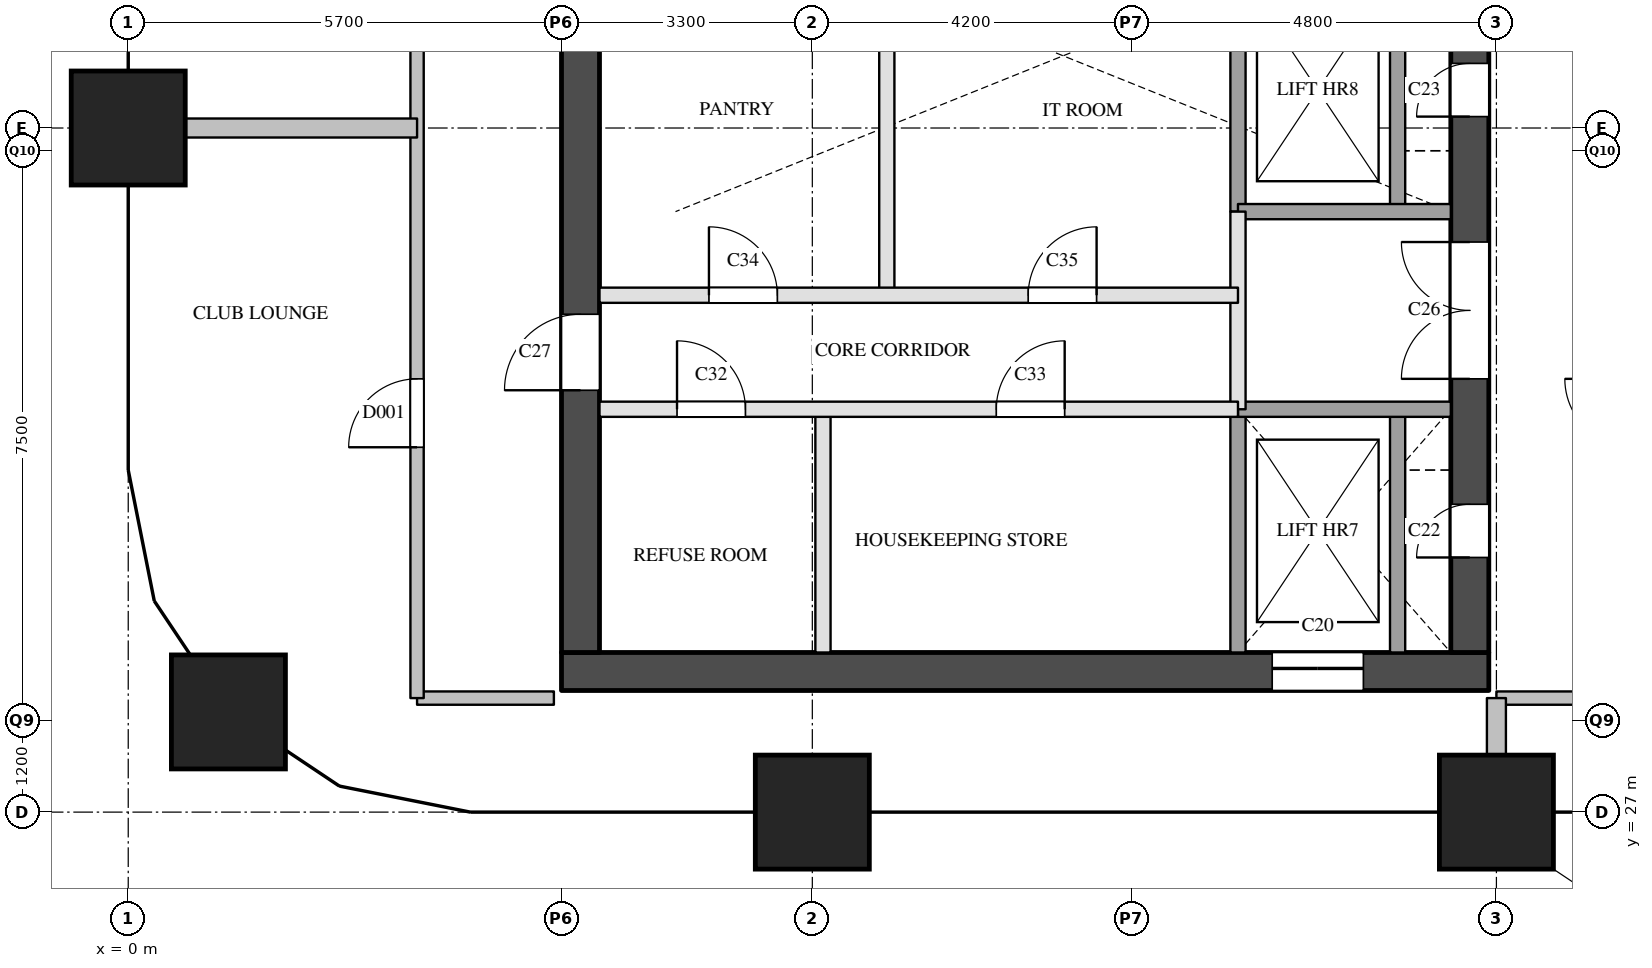
"""IFC4 building model, lengths in metres.
Left out: names, types, materials, properties, quantities, classifications, styles, units other than length and angle.
Written with IfcOpenShell. Run it as: python <this file> out.ifc"""

import sys

from ifc_helpers import new_model, si_unit, direction, frame, frame_2d, origin, origin_2d, place, context, subcontext, project, spatial, rectangle, extrude, element, fill, save


model = new_model("IFC4")
c1 = context("Model", 3, precision=1e-05, world=origin(), true_north=direction((0.0, 1.0)))
c2 = subcontext(c1, "Body", "Model", "MODEL_VIEW")
j1 = project(units=[si_unit("LENGTHUNIT", "METRE"), si_unit("PLANEANGLEUNIT", "RADIAN")], contexts=[c1])
p1 = place(None, origin())
s1 = spatial("IfcSite", under=j1, at=p1, CompositionType="ELEMENT")
p2 = place(p1, origin())
s2 = spatial("IfcBuilding", under=s1, at=p2, CompositionType="ELEMENT")
p3 = place(p2, frame((0.0, 0.0, 185.6)))
s3 = spatial("IfcBuildingStorey", under=s2, at=p3, CompositionType="ELEMENT", Elevation=185.6)
for number, where, z_axis, x_axis in (
    (1, (1.318, 28.318, 0.0), (0.0, 0.0, 1.0), (1.0, 0.0, 0.0)),
    (2, (0.0, 36.0, 0.0), (0.0, 0.0, 1.0), (1.0, 0.0, 0.0)),
    (3, (9.0, 27.0, 0.0), (0.0, 0.0, 1.0), (1.0, 0.0, 0.0)),
    (4, (18.0, 27.0, 0.0), (0.0, 0.0, 1.0), (1.0, 0.0, 0.0)),
):
    element("IfcColumn", number, at=place(p3, frame(where, z_axis=z_axis, x_axis=x_axis)), inside=s3, PredefinedType="COLUMN", context=c2, shape_type="SweptSolid", body=[
        extrude(rectangle(XDim=1.5, YDim=1.5, at=origin_2d()), origin(), (0.0, 0.0, 1.0), 3.9),
    ])
p4 = place(p3, frame((5.7, 28.85, 0.0), z_axis=(0.0, 0.0, 1.0), x_axis=(1.0, 0.0, 0.0)))
e5 = element("IfcWall", 5, at=p4, inside=s3, PredefinedType="SHEAR", context=c2, shape_type="SweptSolid", body=[
    extrude(rectangle(XDim=12.2, YDim=0.5, at=frame_2d((6.1, 0.0))), origin(), (0.0, 0.0, 1.0), 3.6),
])
p5 = place(p4, frame((9.35, 0.0, 0.0)))
e6 = element("IfcOpeningElement", 6, at=p5, cuts=e5, PredefinedType="OPENING", context=c2, shape_type="SweptSolid", body=[
    extrude(rectangle(XDim=1.2, YDim=2.1, at=frame_2d((0.6, 1.05))), frame((0.0, 0.26, 0.0), z_axis=(0.0, -1.0, 0.0), x_axis=(1.0, 0.0, 0.0)), (0.0, 0.0, 1.0), 0.52),
])
p6 = place(p3, frame((5.95, 29.1, 0.0), z_axis=(0.0, 0.0, 1.0), x_axis=(0.0, 1.0, 0.0)))
e7 = element("IfcWall", 7, at=p6, inside=s3, PredefinedType="SHEAR", context=c2, shape_type="SweptSolid", body=[
    extrude(rectangle(XDim=20.3, YDim=0.5, at=frame_2d((10.15, 0.0))), origin(), (0.0, 0.0, 1.0), 3.6),
])
p7 = place(p6, frame((3.45, 0.0, 0.0)))
e8 = element("IfcOpeningElement", 8, at=p7, cuts=e7, PredefinedType="OPENING", context=c2, shape_type="SweptSolid", body=[
    extrude(rectangle(XDim=1.0, YDim=2.1, at=frame_2d((0.5, 1.05))), frame((0.0, 0.26, 0.0), z_axis=(0.0, -1.0, 0.0), x_axis=(1.0, 0.0, 0.0)), (0.0, 0.0, 1.0), 0.52),
])
p8 = place(p6, frame((16.4, 0.0, 0.0)))
e9 = element("IfcOpeningElement", 9, at=p8, cuts=e7, PredefinedType="OPENING", context=c2, shape_type="SweptSolid", body=[
    extrude(rectangle(XDim=1.0, YDim=2.1, at=frame_2d((0.5, 1.05))), frame((0.0, 0.26, 0.0), z_axis=(0.0, -1.0, 0.0), x_axis=(1.0, 0.0, 0.0)), (0.0, 0.0, 1.0), 0.52),
])
p9 = place(p3, frame((17.65, 29.1, 0.0), z_axis=(0.0, 0.0, 1.0), x_axis=(0.0, 1.0, 0.0)))
e10 = element("IfcWall", 10, at=p9, inside=s3, PredefinedType="SHEAR", context=c2, shape_type="SweptSolid", body=[
    extrude(rectangle(XDim=20.3, YDim=0.5, at=frame_2d((10.15, 0.0))), origin(), (0.0, 0.0, 1.0), 3.6),
])
p10 = place(p9, frame((1.25, 0.0, 0.0)))
e11 = element("IfcOpeningElement", 11, at=p10, cuts=e10, PredefinedType="OPENING", context=c2, shape_type="SweptSolid", body=[
    extrude(rectangle(XDim=0.7, YDim=2.1, at=frame_2d((0.35, 1.05))), frame((0.0, 0.26, 0.0), z_axis=(0.0, -1.0, 0.0), x_axis=(1.0, 0.0, 0.0)), (0.0, 0.0, 1.0), 0.52),
])
p11 = place(p9, frame((7.05, 0.0, 0.0)))
e12 = element("IfcOpeningElement", 12, at=p11, cuts=e10, PredefinedType="OPENING", context=c2, shape_type="SweptSolid", body=[
    extrude(rectangle(XDim=0.7, YDim=2.1, at=frame_2d((0.35, 1.05))), frame((0.0, 0.26, 0.0), z_axis=(0.0, -1.0, 0.0), x_axis=(1.0, 0.0, 0.0)), (0.0, 0.0, 1.0), 0.52),
])
p12 = place(p9, frame((3.6, 0.0, 0.0)))
e13 = element("IfcOpeningElement", 13, at=p12, cuts=e10, PredefinedType="OPENING", context=c2, shape_type="SweptSolid", body=[
    extrude(rectangle(XDim=1.8, YDim=2.1, at=frame_2d((0.9, 1.05))), frame((0.0, 0.26, 0.0), z_axis=(0.0, -1.0, 0.0), x_axis=(1.0, 0.0, 0.0)), (0.0, 0.0, 1.0), 0.52),
])
p13 = place(p3, frame((9.14, 29.1, 0.0), z_axis=(0.0, 0.0, 1.0), x_axis=(0.0, 1.0, 0.0)))
e14 = element("IfcWall", 14, at=p13, inside=s3, PredefinedType="PARTITIONING", context=c2, shape_type="SweptSolid", body=[
    extrude(rectangle(XDim=3.2, YDim=0.2, at=frame_2d((1.6, 0.0))), origin(), (0.0, 0.0, 1.0), 3.6),
])
p14 = place(p3, frame((9.98, 33.8, 0.0), z_axis=(0.0, 0.0, 1.0), x_axis=(0.0, 1.0, 0.0)))
e15 = element("IfcWall", 15, at=p14, inside=s3, PredefinedType="PARTITIONING", context=c2, shape_type="SweptSolid", body=[
    extrude(rectangle(XDim=4.3, YDim=0.2, at=frame_2d((2.15, 0.0))), origin(), (0.0, 0.0, 1.0), 3.6),
])
p15 = place(p3, frame((14.6, 32.3, 0.0), z_axis=(0.0, 0.0, 1.0), x_axis=(0.0, 1.0, 0.0)))
e16 = element("IfcWall", 16, at=p15, inside=s3, PredefinedType="PARTITIONING", context=c2, shape_type="SweptSolid", body=[
    extrude(rectangle(XDim=2.6, YDim=0.2, at=frame_2d((1.3, 0.0))), origin(), (0.0, 0.0, 1.0), 3.6),
])
p16 = place(p3, frame((14.6, 29.1, 0.0), z_axis=(0.0, 0.0, 1.0), x_axis=(0.0, 1.0, 0.0)))
e17 = element("IfcWall", 17, at=p16, inside=s3, PredefinedType="SOLIDWALL", context=c2, shape_type="SweptSolid", body=[
    extrude(rectangle(XDim=3.2, YDim=0.2, at=frame_2d((1.6, 0.0))), origin(), (0.0, 0.0, 1.0), 3.6),
])
p17 = place(p3, frame((14.6, 34.9, 0.0), z_axis=(0.0, 0.0, 1.0), x_axis=(0.0, 1.0, 0.0)))
e18 = element("IfcWall", 18, at=p17, inside=s3, PredefinedType="SOLIDWALL", context=c2, shape_type="SweptSolid", body=[
    extrude(rectangle(XDim=3.2, YDim=0.2, at=frame_2d((1.6, 0.0))), origin(), (0.0, 0.0, 1.0), 3.6),
])
p18 = place(p3, frame((16.7, 29.1, 0.0), z_axis=(0.0, 0.0, 1.0), x_axis=(0.0, 1.0, 0.0)))
e19 = element("IfcWall", 19, at=p18, inside=s3, PredefinedType="SOLIDWALL", context=c2, shape_type="SweptSolid", body=[
    extrude(rectangle(XDim=3.2, YDim=0.2, at=frame_2d((1.6, 0.0))), origin(), (0.0, 0.0, 1.0), 3.6),
])
p19 = place(p3, frame((16.7, 34.9, 0.0), z_axis=(0.0, 0.0, 1.0), x_axis=(0.0, 1.0, 0.0)))
e20 = element("IfcWall", 20, at=p19, inside=s3, PredefinedType="SOLIDWALL", context=c2, shape_type="SweptSolid", body=[
    extrude(rectangle(XDim=3.2, YDim=0.2, at=frame_2d((1.6, 0.0))), origin(), (0.0, 0.0, 1.0), 3.6),
])
p20 = place(p3, frame((6.2, 32.3, 0.0), z_axis=(0.0, 0.0, 1.0), x_axis=(1.0, 0.0, 0.0)))
e21 = element("IfcWall", 21, at=p20, inside=s3, PredefinedType="PARTITIONING", context=c2, shape_type="SweptSolid", body=[
    extrude(rectangle(XDim=8.4, YDim=0.2, at=frame_2d((4.2, 0.0))), origin(), (0.0, 0.0, 1.0), 3.6),
])
p21 = place(p20, frame((1.02, 0.0, 0.0)))
e22 = element("IfcOpeningElement", 22, at=p21, cuts=e21, PredefinedType="OPENING", context=c2, shape_type="SweptSolid", body=[
    extrude(rectangle(XDim=0.9, YDim=2.1, at=frame_2d((0.45, 1.05))), frame((0.0, 0.11, 0.0), z_axis=(0.0, -1.0, 0.0), x_axis=(1.0, 0.0, 0.0)), (0.0, 0.0, 1.0), 0.22),
])
p22 = place(p20, frame((5.22, 0.0, 0.0)))
e23 = element("IfcOpeningElement", 23, at=p22, cuts=e21, PredefinedType="OPENING", context=c2, shape_type="SweptSolid", body=[
    extrude(rectangle(XDim=0.9, YDim=2.1, at=frame_2d((0.45, 1.05))), frame((0.0, 0.11, 0.0), z_axis=(0.0, -1.0, 0.0), x_axis=(1.0, 0.0, 0.0)), (0.0, 0.0, 1.0), 0.22),
])
p23 = place(p3, frame((14.6, 32.3, 0.0), z_axis=(0.0, 0.0, 1.0), x_axis=(1.0, 0.0, 0.0)))
e24 = element("IfcWall", 24, at=p23, inside=s3, PredefinedType="SOLIDWALL", context=c2, shape_type="SweptSolid", body=[
    extrude(rectangle(XDim=2.8, YDim=0.2, at=frame_2d((1.4, 0.0))), origin(), (0.0, 0.0, 1.0), 3.6),
])
p24 = place(p3, frame((6.2, 33.8, 0.0), z_axis=(0.0, 0.0, 1.0), x_axis=(1.0, 0.0, 0.0)))
e25 = element("IfcWall", 25, at=p24, inside=s3, PredefinedType="PARTITIONING", context=c2, shape_type="SweptSolid", body=[
    extrude(rectangle(XDim=8.4, YDim=0.2, at=frame_2d((4.2, 0.0))), origin(), (0.0, 0.0, 1.0), 3.6),
])
p25 = place(p24, frame((1.44, 0.0, 0.0)))
e26 = element("IfcOpeningElement", 26, at=p25, cuts=e25, PredefinedType="OPENING", context=c2, shape_type="SweptSolid", body=[
    extrude(rectangle(XDim=0.9, YDim=2.1, at=frame_2d((0.45, 1.05))), frame((0.0, 0.11, 0.0), z_axis=(0.0, -1.0, 0.0), x_axis=(1.0, 0.0, 0.0)), (0.0, 0.0, 1.0), 0.22),
])
p26 = place(p24, frame((5.64, 0.0, 0.0)))
e27 = element("IfcOpeningElement", 27, at=p26, cuts=e25, PredefinedType="OPENING", context=c2, shape_type="SweptSolid", body=[
    extrude(rectangle(XDim=0.9, YDim=2.1, at=frame_2d((0.45, 1.05))), frame((0.0, 0.11, 0.0), z_axis=(0.0, -1.0, 0.0), x_axis=(1.0, 0.0, 0.0)), (0.0, 0.0, 1.0), 0.22),
])
p27 = place(p3, frame((14.6, 34.9, 0.0), z_axis=(0.0, 0.0, 1.0), x_axis=(1.0, 0.0, 0.0)))
e28 = element("IfcWall", 28, at=p27, inside=s3, PredefinedType="SOLIDWALL", context=c2, shape_type="SweptSolid", body=[
    extrude(rectangle(XDim=2.8, YDim=0.2, at=frame_2d((1.4, 0.0))), origin(), (0.0, 0.0, 1.0), 3.6),
])
for number, where, z_axis, x_axis in (
    (29, (3.8, 28.5, 0.0), (0.0, 0.0, 1.0), (1.0, 0.0, 0.0)),
    (30, (18.0, 28.5, 0.0), (0.0, 0.0, 1.0), (1.0, 0.0, 0.0)),
):
    element("IfcWall", number, at=place(p3, frame(where, z_axis=z_axis, x_axis=x_axis)), inside=s3, PredefinedType="PARTITIONING", context=c2, shape_type="SweptSolid", body=[
        extrude(rectangle(XDim=1.8, YDim=0.175, at=frame_2d((0.9, 0.0))), origin(), (0.0, 0.0, 1.0), 3.6),
    ])
p28 = place(p3, frame((3.8, 28.5, 0.0), z_axis=(0.0, 0.0, 1.0), x_axis=(0.0, 1.0, 0.0)))
e31 = element("IfcWall", 31, at=p28, inside=s3, PredefinedType="PARTITIONING", context=c2, shape_type="SweptSolid", body=[
    extrude(rectangle(XDim=23.3, YDim=0.175, at=frame_2d((11.65, 0.0))), origin(), (0.0, 0.0, 1.0), 3.6),
])
p29 = place(p28, frame((3.3, 0.0, 0.0)))
e32 = element("IfcOpeningElement", 32, at=p29, cuts=e31, PredefinedType="OPENING", context=c2, shape_type="SweptSolid", body=[
    extrude(rectangle(XDim=0.9, YDim=2.1, at=frame_2d((0.45, 1.05))), frame((0.0, 0.097, 0.0), z_axis=(0.0, -1.0, 0.0), x_axis=(1.0, 0.0, 0.0)), (0.0, 0.0, 1.0), 0.195),
])
p30 = place(p28, frame((12.45, 0.0, 0.0)))
e33 = element("IfcOpeningElement", 33, at=p30, cuts=e31, PredefinedType="OPENING", context=c2, shape_type="SweptSolid", body=[
    extrude(rectangle(XDim=0.9, YDim=2.1, at=frame_2d((0.45, 1.05))), frame((0.0, 0.097, 0.0), z_axis=(0.0, -1.0, 0.0), x_axis=(1.0, 0.0, 0.0)), (0.0, 0.0, 1.0), 0.195),
])
p31 = place(p28, frame((20.35, 0.0, 0.0)))
e34 = element("IfcOpeningElement", 34, at=p31, cuts=e31, PredefinedType="OPENING", context=c2, shape_type="SweptSolid", body=[
    extrude(rectangle(XDim=0.9, YDim=2.1, at=frame_2d((0.45, 1.05))), frame((0.0, 0.097, 0.0), z_axis=(0.0, -1.0, 0.0), x_axis=(1.0, 0.0, 0.0)), (0.0, 0.0, 1.0), 0.195),
])
p32 = place(p3, frame((0.0, 36.0, 0.0), z_axis=(0.0, 0.0, 1.0), x_axis=(1.0, 0.0, 0.0)))
e35 = element("IfcWall", 35, at=p32, inside=s3, PredefinedType="PARTITIONING", context=c2, shape_type="SweptSolid", body=[
    extrude(rectangle(XDim=3.8, YDim=0.25, at=frame_2d((1.9, 0.0))), origin(), (0.0, 0.0, 1.0), 3.6),
])
p33 = place(p3, frame((18.0, 27.0, 0.0), z_axis=(0.0, 0.0, 1.0), x_axis=(0.0, 1.0, 0.0)))
e36 = element("IfcWall", 36, at=p33, inside=s3, PredefinedType="PARTITIONING", context=c2, shape_type="SweptSolid", body=[
    extrude(rectangle(XDim=1.5, YDim=0.25, at=frame_2d((0.75, 0.0))), origin(), (0.0, 0.0, 1.0), 3.6),
])
p34 = place(p5, origin())
e37 = element("IfcDoor", 37, at=p34, inside=s3, OperationType="SLIDING_TO_LEFT", PredefinedType="DOOR", context=c2, shape_type="SweptSolid", body=[
    extrude(rectangle(XDim=1.2, YDim=2.1, at=frame_2d((0.6, 1.05))), frame((0.0, 0.025, 0.0), z_axis=(0.0, -1.0, 0.0), x_axis=(1.0, 0.0, 0.0)), (0.0, 0.0, 1.0), 0.05),
])
fill(e6, e37)
p35 = place(p10, origin())
e38 = element("IfcDoor", 38, at=p35, inside=s3, OperationType="SINGLE_SWING_LEFT", PredefinedType="DOOR", context=c2, shape_type="SweptSolid", body=[
    extrude(rectangle(XDim=0.7, YDim=2.1, at=frame_2d((0.35, 1.05))), frame((0.0, 0.025, 0.0), z_axis=(0.0, -1.0, 0.0), x_axis=(1.0, 0.0, 0.0)), (0.0, 0.0, 1.0), 0.05),
])
fill(e11, e38)
p36 = place(p11, origin())
e39 = element("IfcDoor", 39, at=p36, inside=s3, OperationType="SINGLE_SWING_LEFT", PredefinedType="DOOR", context=c2, shape_type="SweptSolid", body=[
    extrude(rectangle(XDim=0.7, YDim=2.1, at=frame_2d((0.35, 1.05))), frame((0.0, 0.025, 0.0), z_axis=(0.0, -1.0, 0.0), x_axis=(1.0, 0.0, 0.0)), (0.0, 0.0, 1.0), 0.05),
])
fill(e12, e39)
p37 = place(p12, origin())
e40 = element("IfcDoor", 40, at=p37, inside=s3, OperationType="DOUBLE_DOOR_SINGLE_SWING", PredefinedType="DOOR", context=c2, shape_type="SweptSolid", body=[
    extrude(rectangle(XDim=1.8, YDim=2.1, at=frame_2d((0.9, 1.05))), frame((0.0, 0.025, 0.0), z_axis=(0.0, -1.0, 0.0), x_axis=(1.0, 0.0, 0.0)), (0.0, 0.0, 1.0), 0.05),
])
fill(e13, e40)
p38 = place(p7, origin())
e41 = element("IfcDoor", 41, at=p38, inside=s3, OperationType="SINGLE_SWING_LEFT", PredefinedType="DOOR", context=c2, shape_type="SweptSolid", body=[
    extrude(rectangle(XDim=1.0, YDim=2.1, at=frame_2d((0.5, 1.05))), frame((0.0, 0.025, 0.0), z_axis=(0.0, -1.0, 0.0), x_axis=(1.0, 0.0, 0.0)), (0.0, 0.0, 1.0), 0.05),
])
fill(e8, e41)
p39 = place(p21, origin())
e42 = element("IfcDoor", 42, at=p39, inside=s3, OperationType="SINGLE_SWING_LEFT", PredefinedType="DOOR", context=c2, shape_type="SweptSolid", body=[
    extrude(rectangle(XDim=0.9, YDim=2.1, at=frame_2d((0.45, 1.05))), frame((0.0, 0.025, 0.0), z_axis=(0.0, -1.0, 0.0), x_axis=(1.0, 0.0, 0.0)), (0.0, 0.0, 1.0), 0.05),
])
fill(e22, e42)
p40 = place(p22, origin())
e43 = element("IfcDoor", 43, at=p40, inside=s3, OperationType="SINGLE_SWING_RIGHT", PredefinedType="DOOR", context=c2, shape_type="SweptSolid", body=[
    extrude(rectangle(XDim=0.9, YDim=2.1, at=frame_2d((0.45, 1.05))), frame((0.0, 0.025, 0.0), z_axis=(0.0, -1.0, 0.0), x_axis=(1.0, 0.0, 0.0)), (0.0, 0.0, 1.0), 0.05),
])
fill(e23, e43)
p41 = place(p25, origin())
e44 = element("IfcDoor", 44, at=p41, inside=s3, OperationType="SINGLE_SWING_LEFT", PredefinedType="DOOR", context=c2, shape_type="SweptSolid", body=[
    extrude(rectangle(XDim=0.9, YDim=2.1, at=frame_2d((0.45, 1.05))), frame((0.0, 0.025, 0.0), z_axis=(0.0, -1.0, 0.0), x_axis=(1.0, 0.0, 0.0)), (0.0, 0.0, 1.0), 0.05),
])
fill(e26, e44)
p42 = place(p26, origin())
e45 = element("IfcDoor", 45, at=p42, inside=s3, OperationType="SINGLE_SWING_RIGHT", PredefinedType="DOOR", context=c2, shape_type="SweptSolid", body=[
    extrude(rectangle(XDim=0.9, YDim=2.1, at=frame_2d((0.45, 1.05))), frame((0.0, 0.025, 0.0), z_axis=(0.0, -1.0, 0.0), x_axis=(1.0, 0.0, 0.0)), (0.0, 0.0, 1.0), 0.05),
])
fill(e27, e45)
p43 = place(p29, origin())
e46 = element("IfcDoor", 46, at=p43, inside=s3, OperationType="SINGLE_SWING_LEFT", PredefinedType="DOOR", context=c2, shape_type="SweptSolid", body=[
    extrude(rectangle(XDim=0.9, YDim=2.1, at=frame_2d((0.45, 1.05))), frame((0.0, 0.025, 0.0), z_axis=(0.0, -1.0, 0.0), x_axis=(1.0, 0.0, 0.0)), (0.0, 0.0, 1.0), 0.05),
])
fill(e32, e46)
save(model, sys.argv[1])
